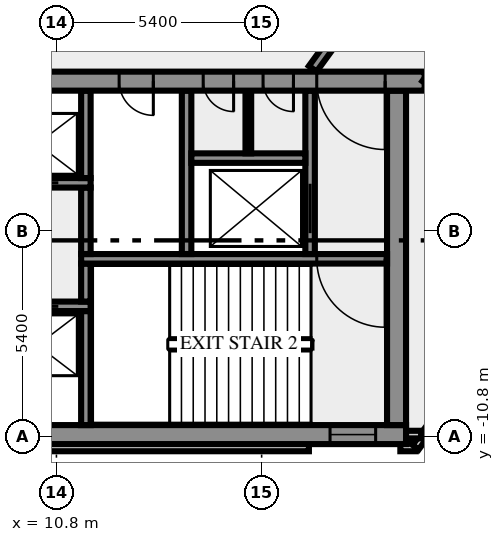
"""IFC4 building model, lengths in metres.
Left out: names, types, materials, properties, quantities, classifications, styles, units other than length and angle.
Written with IfcOpenShell. Run it as: python <this file> out.ifc"""

import sys

from ifc_helpers import new_model, si_unit, direction, frame, frame_2d, origin, place, context, subcontext, project, spatial, rectangle, extrude, element, fill, save


model = new_model("IFC4")
c1 = context("Model", 3, precision=1e-05, world=origin(), true_north=direction((0.0, 1.0)))
c2 = subcontext(c1, "Body", "Model", "MODEL_VIEW")
j1 = project(units=[si_unit("LENGTHUNIT", "METRE"), si_unit("PLANEANGLEUNIT", "RADIAN")], contexts=[c1])
p1 = place(None, origin())
s1 = spatial("IfcSite", under=j1, at=p1, CompositionType="ELEMENT")
p2 = place(p1, origin())
s2 = spatial("IfcBuilding", under=s1, at=p2, CompositionType="ELEMENT")
p3 = place(p2, frame((0.0, 0.0, 164.0)))
s3 = spatial("IfcBuildingStorey", under=s2, at=p3, CompositionType="ELEMENT", Elevation=164.0)
p4 = place(p3, frame((-17.444, -11.088, 0.0), z_axis=(0.0, 0.0, 1.0), x_axis=(1.0, 0.0, 0.0)))
e1 = element("IfcWall", 1, at=p4, inside=s3, PredefinedType="SOLIDWALL", context=c2, shape_type="SweptSolid", body=[
    extrude(rectangle(XDim=34.888, YDim=0.2, at=frame_2d((17.444, 0.0))), origin(), (0.0, 0.0, 1.0), 3.65),
])
p5 = place(p3, frame((19.85, -11.088, 0.0), z_axis=(0.0, 0.0, 1.0), x_axis=(1.0, 0.0, 0.0)))
e2 = element("IfcWall", 2, at=p5, inside=s3, PredefinedType="SOLIDWALL", context=c2, shape_type="SweptSolid", body=[
    extrude(rectangle(XDim=0.406, YDim=0.2, at=frame_2d((0.203, 0.0))), origin(), (0.0, 0.0, 1.0), 3.65),
])
p6 = place(p3, frame((20.253, -11.083, 0.0), z_axis=(0.0, 0.0, 1.0), x_axis=(0.587766567315, 0.809030569476, 0.0)))
e3 = element("IfcWall", 3, at=p6, inside=s3, PredefinedType="SOLIDWALL", context=c2, shape_type="SweptSolid", body=[
    extrude(rectangle(XDim=2.688, YDim=0.2, at=frame_2d((1.344, 0.0))), origin(), (0.0, 0.0, 1.0), 3.65),
])
p7 = place(p3, frame((19.98, -10.75, 0.0), z_axis=(0.0, 0.0, 1.0), x_axis=(1.0, 0.0, 0.0)))
e4 = element("IfcWall", 4, at=p7, inside=s3, PredefinedType="SOLIDWALL", context=c2, shape_type="SweptSolid", body=[
    extrude(rectangle(XDim=0.417, YDim=0.2, at=frame_2d((0.208, 0.0))), origin(), (0.0, 0.0, 1.0), 3.65),
])
p8 = place(p3, frame((-20.0, -10.75, 0.0), z_axis=(0.0, 0.0, 1.0), x_axis=(1.0, 0.0, 0.0)))
e5 = element("IfcWall", 5, at=p8, inside=s3, PredefinedType="SHEAR", context=c2, shape_type="SweptSolid", body=[
    extrude(rectangle(XDim=40.0, YDim=0.5, at=frame_2d((20.0, 0.0))), origin(), (0.0, 0.0, 1.0), 3.65),
])
p9 = place(p8, frame((0.8, 0.0, 1.0)))
e6 = element("IfcOpeningElement", 6, at=p9, cuts=e5, PredefinedType="OPENING", context=c2, shape_type="SweptSolid", body=[
    extrude(rectangle(XDim=1.2, YDim=1.2, at=frame_2d((0.6, 0.6))), frame((0.0, 0.26, 0.0), z_axis=(0.0, -1.0, 0.0), x_axis=(1.0, 0.0, 0.0)), (0.0, 0.0, 1.0), 0.52),
])
p10 = place(p8, frame((38.0, 0.0, 1.0)))
e7 = element("IfcOpeningElement", 7, at=p10, cuts=e5, PredefinedType="OPENING", context=c2, shape_type="SweptSolid", body=[
    extrude(rectangle(XDim=1.2, YDim=1.2, at=frame_2d((0.6, 0.6))), frame((0.0, 0.26, 0.0), z_axis=(0.0, -1.0, 0.0), x_axis=(1.0, 0.0, 0.0)), (0.0, 0.0, 1.0), 0.52),
])
p11 = place(p3, frame((11.575, -10.5, 0.0), z_axis=(0.0, 0.0, 1.0), x_axis=(0.0, 1.0, 0.0)))
e8 = element("IfcWall", 8, at=p11, inside=s3, PredefinedType="SHEAR", context=c2, shape_type="SweptSolid", body=[
    extrude(rectangle(XDim=3.0, YDim=0.25, at=frame_2d((1.5, 0.0))), origin(), (0.0, 0.0, 1.0), 3.65),
])
p12 = place(p3, frame((19.75, -10.5, 0.0), z_axis=(0.0, 0.0, 1.0), x_axis=(0.0, 1.0, 0.0)))
e9 = element("IfcWall", 9, at=p12, inside=s3, PredefinedType="SHEAR", context=c2, shape_type="SweptSolid", body=[
    extrude(rectangle(XDim=8.8, YDim=0.5, at=frame_2d((4.4, 0.0))), origin(), (0.0, 0.0, 1.0), 3.65),
])
p13 = place(p3, frame((11.7, -7.375, 0.0), z_axis=(0.0, 0.0, 1.0), x_axis=(-1.0, 0.0, 0.0)))
e10 = element("IfcWall", 10, at=p13, inside=s3, PredefinedType="SHEAR", context=c2, shape_type="SweptSolid", body=[
    extrude(rectangle(XDim=23.4, YDim=0.25, at=frame_2d((11.7, 0.0))), origin(), (0.0, 0.0, 1.0), 3.65),
])
p14 = place(p13, frame((22.012, 0.0, 0.0)))
e11 = element("IfcOpeningElement", 11, at=p14, cuts=e10, PredefinedType="OPENING", context=c2, shape_type="SweptSolid", body=[
    extrude(rectangle(XDim=0.9, YDim=2.1, at=frame_2d((0.45, 1.05))), frame((0.0, 0.135, 0.0), z_axis=(0.0, -1.0, 0.0), x_axis=(1.0, 0.0, 0.0)), (0.0, 0.0, 1.0), 0.27),
])
p15 = place(p13, frame((20.05, 0.0, 0.0)))
e12 = element("IfcOpeningElement", 12, at=p15, cuts=e10, PredefinedType="OPENING", context=c2, shape_type="SweptSolid", body=[
    extrude(rectangle(XDim=0.9, YDim=2.1, at=frame_2d((0.45, 1.05))), frame((0.0, 0.135, 0.0), z_axis=(0.0, -1.0, 0.0), x_axis=(1.0, 0.0, 0.0)), (0.0, 0.0, 1.0), 0.27),
])
p16 = place(p13, frame((17.088, 0.0, 0.0)))
e13 = element("IfcOpeningElement", 13, at=p16, cuts=e10, PredefinedType="OPENING", context=c2, shape_type="SweptSolid", body=[
    extrude(rectangle(XDim=0.9, YDim=2.1, at=frame_2d((0.45, 1.05))), frame((0.0, 0.135, 0.0), z_axis=(0.0, -1.0, 0.0), x_axis=(1.0, 0.0, 0.0)), (0.0, 0.0, 1.0), 0.27),
])
p17 = place(p13, frame((14.45, 0.0, 0.0)))
e14 = element("IfcOpeningElement", 14, at=p17, cuts=e10, PredefinedType="OPENING", context=c2, shape_type="SweptSolid", body=[
    extrude(rectangle(XDim=0.9, YDim=2.1, at=frame_2d((0.45, 1.05))), frame((0.0, 0.135, 0.0), z_axis=(0.0, -1.0, 0.0), x_axis=(1.0, 0.0, 0.0)), (0.0, 0.0, 1.0), 0.27),
])
p18 = place(p13, frame((12.95, 0.0, 0.0)))
e15 = element("IfcOpeningElement", 15, at=p18, cuts=e10, PredefinedType="OPENING", context=c2, shape_type="SweptSolid", body=[
    extrude(rectangle(XDim=0.9, YDim=2.1, at=frame_2d((0.45, 1.05))), frame((0.0, 0.135, 0.0), z_axis=(0.0, -1.0, 0.0), x_axis=(1.0, 0.0, 0.0)), (0.0, 0.0, 1.0), 0.27),
])
p19 = place(p13, frame((11.475, 0.0, 0.0)))
e16 = element("IfcOpeningElement", 16, at=p19, cuts=e10, PredefinedType="OPENING", context=c2, shape_type="SweptSolid", body=[
    extrude(rectangle(XDim=0.9, YDim=2.1, at=frame_2d((0.45, 1.05))), frame((0.0, 0.135, 0.0), z_axis=(0.0, -1.0, 0.0), x_axis=(1.0, 0.0, 0.0)), (0.0, 0.0, 1.0), 0.27),
])
p20 = place(p13, frame((10.45, 0.0, 0.0)))
e17 = element("IfcOpeningElement", 17, at=p20, cuts=e10, PredefinedType="OPENING", context=c2, shape_type="SweptSolid", body=[
    extrude(rectangle(XDim=0.5, YDim=2.1, at=frame_2d((0.25, 1.05))), frame((0.0, 0.135, 0.0), z_axis=(0.0, -1.0, 0.0), x_axis=(1.0, 0.0, 0.0)), (0.0, 0.0, 1.0), 0.27),
])
p21 = place(p13, frame((8.35, 0.0, 0.0)))
e18 = element("IfcOpeningElement", 18, at=p21, cuts=e10, PredefinedType="OPENING", context=c2, shape_type="SweptSolid", body=[
    extrude(rectangle(XDim=1.1, YDim=2.1, at=frame_2d((0.55, 1.05))), frame((0.0, 0.135, 0.0), z_axis=(0.0, -1.0, 0.0), x_axis=(1.0, 0.0, 0.0)), (0.0, 0.0, 1.0), 0.27),
])
p22 = place(p13, frame((5.85, 0.0, 0.0)))
e19 = element("IfcOpeningElement", 19, at=p22, cuts=e10, PredefinedType="OPENING", context=c2, shape_type="SweptSolid", body=[
    extrude(rectangle(XDim=1.1, YDim=2.1, at=frame_2d((0.55, 1.05))), frame((0.0, 0.135, 0.0), z_axis=(0.0, -1.0, 0.0), x_axis=(1.0, 0.0, 0.0)), (0.0, 0.0, 1.0), 0.27),
])
p23 = place(p13, frame((3.35, 0.0, 0.0)))
e20 = element("IfcOpeningElement", 20, at=p23, cuts=e10, PredefinedType="OPENING", context=c2, shape_type="SweptSolid", body=[
    extrude(rectangle(XDim=1.1, YDim=2.1, at=frame_2d((0.55, 1.05))), frame((0.0, 0.135, 0.0), z_axis=(0.0, -1.0, 0.0), x_axis=(1.0, 0.0, 0.0)), (0.0, 0.0, 1.0), 0.27),
])
p24 = place(p13, frame((0.85, 0.0, 0.0)))
e21 = element("IfcOpeningElement", 21, at=p24, cuts=e10, PredefinedType="OPENING", context=c2, shape_type="SweptSolid", body=[
    extrude(rectangle(XDim=1.1, YDim=2.1, at=frame_2d((0.55, 1.05))), frame((0.0, 0.135, 0.0), z_axis=(0.0, -1.0, 0.0), x_axis=(1.0, 0.0, 0.0)), (0.0, 0.0, 1.0), 0.27),
])
p25 = place(p3, frame((11.575, -7.25, 0.0), z_axis=(0.0, 0.0, 1.0), x_axis=(0.0, 1.0, 0.0)))
e22 = element("IfcWall", 22, at=p25, inside=s3, PredefinedType="SHEAR", context=c2, shape_type="SweptSolid", body=[
    extrude(rectangle(XDim=1.0, YDim=0.25, at=frame_2d((0.5, 0.0))), origin(), (0.0, 0.0, 1.0), 3.65),
])
p26 = place(p3, frame((19.5, -6.125, 0.0), z_axis=(0.0, 0.0, 1.0), x_axis=(-1.0, 0.0, 0.0)))
e23 = element("IfcWall", 23, at=p26, inside=s3, PredefinedType="SHEAR", context=c2, shape_type="SweptSolid", body=[
    extrude(rectangle(XDim=8.05, YDim=0.25, at=frame_2d((4.025, 0.0))), origin(), (0.0, 0.0, 1.0), 3.65),
])
p27 = place(p26, frame((0.05, 0.0, 0.0)))
e24 = element("IfcOpeningElement", 24, at=p27, cuts=e23, PredefinedType="OPENING", context=c2, shape_type="SweptSolid", body=[
    extrude(rectangle(XDim=1.8, YDim=2.1, at=frame_2d((0.9, 1.05))), frame((0.0, 0.135, 0.0), z_axis=(0.0, -1.0, 0.0), x_axis=(1.0, 0.0, 0.0)), (0.0, 0.0, 1.0), 0.27),
])
p28 = place(p3, frame((11.575, -6.0, 0.0), z_axis=(0.0, 0.0, 1.0), x_axis=(0.0, 1.0, 0.0)))
e25 = element("IfcWall", 25, at=p28, inside=s3, PredefinedType="SHEAR", context=c2, shape_type="SweptSolid", body=[
    extrude(rectangle(XDim=1.75, YDim=0.25, at=frame_2d((0.875, 0.0))), origin(), (0.0, 0.0, 1.0), 3.65),
])
p29 = place(p3, frame((14.225, -6.0, 0.0), z_axis=(0.0, 0.0, 1.0), x_axis=(0.0, 1.0, 0.0)))
e26 = element("IfcWall", 26, at=p29, inside=s3, PredefinedType="SHEAR", context=c2, shape_type="SweptSolid", body=[
    extrude(rectangle(XDim=4.3, YDim=0.25, at=frame_2d((2.15, 0.0))), origin(), (0.0, 0.0, 1.0), 3.65),
])
p30 = place(p3, frame((17.475, -6.0, 0.0), z_axis=(0.0, 0.0, 1.0), x_axis=(0.0, 1.0, 0.0)))
e27 = element("IfcWall", 27, at=p30, inside=s3, PredefinedType="SHEAR", context=c2, shape_type="SweptSolid", body=[
    extrude(rectangle(XDim=4.3, YDim=0.25, at=frame_2d((2.15, 0.0))), origin(), (0.0, 0.0, 1.0), 3.65),
])
p31 = place(p30, frame((0.55, 0.0, 0.0)))
e28 = element("IfcOpeningElement", 28, at=p31, cuts=e27, PredefinedType="OPENING", context=c2, shape_type="SweptSolid", body=[
    extrude(rectangle(XDim=1.3, YDim=2.1, at=frame_2d((0.65, 1.05))), frame((0.0, 0.135, 0.0), z_axis=(0.0, -1.0, 0.0), x_axis=(1.0, 0.0, 0.0)), (0.0, 0.0, 1.0), 0.27),
])
p32 = place(p3, frame((-0.6, -4.125, 0.0), z_axis=(0.0, 0.0, 1.0), x_axis=(1.0, 0.0, 0.0)))
e29 = element("IfcWall", 29, at=p32, inside=s3, PredefinedType="SHEAR", context=c2, shape_type="SweptSolid", body=[
    extrude(rectangle(XDim=12.3, YDim=0.25, at=frame_2d((6.15, 0.0))), origin(), (0.0, 0.0, 1.0), 3.65),
])
p33 = place(p32, frame((2.75, 0.0, 0.0)))
e30 = element("IfcOpeningElement", 30, at=p33, cuts=e29, PredefinedType="OPENING", context=c2, shape_type="SweptSolid", body=[
    extrude(rectangle(XDim=1.3, YDim=2.1, at=frame_2d((0.65, 1.05))), frame((0.0, 0.135, 0.0), z_axis=(0.0, -1.0, 0.0), x_axis=(1.0, 0.0, 0.0)), (0.0, 0.0, 1.0), 0.27),
])
p34 = place(p32, frame((5.35, 0.0, 0.0)))
e31 = element("IfcOpeningElement", 31, at=p34, cuts=e29, PredefinedType="OPENING", context=c2, shape_type="SweptSolid", body=[
    extrude(rectangle(XDim=1.1, YDim=2.1, at=frame_2d((0.55, 1.05))), frame((0.0, 0.135, 0.0), z_axis=(0.0, -1.0, 0.0), x_axis=(1.0, 0.0, 0.0)), (0.0, 0.0, 1.0), 0.27),
])
p35 = place(p32, frame((7.85, 0.0, 0.0)))
e32 = element("IfcOpeningElement", 32, at=p35, cuts=e29, PredefinedType="OPENING", context=c2, shape_type="SweptSolid", body=[
    extrude(rectangle(XDim=1.1, YDim=2.1, at=frame_2d((0.55, 1.05))), frame((0.0, 0.135, 0.0), z_axis=(0.0, -1.0, 0.0), x_axis=(1.0, 0.0, 0.0)), (0.0, 0.0, 1.0), 0.27),
])
p36 = place(p32, frame((10.35, 0.0, 0.0)))
e33 = element("IfcOpeningElement", 33, at=p36, cuts=e29, PredefinedType="OPENING", context=c2, shape_type="SweptSolid", body=[
    extrude(rectangle(XDim=1.1, YDim=2.1, at=frame_2d((0.55, 1.05))), frame((0.0, 0.135, 0.0), z_axis=(0.0, -1.0, 0.0), x_axis=(1.0, 0.0, 0.0)), (0.0, 0.0, 1.0), 0.27),
])
p37 = place(p3, frame((11.575, -4.0, 0.0), z_axis=(0.0, 0.0, 1.0), x_axis=(0.0, 1.0, 0.0)))
e34 = element("IfcWall", 34, at=p37, inside=s3, PredefinedType="SHEAR", context=c2, shape_type="SweptSolid", body=[
    extrude(rectangle(XDim=2.3, YDim=0.25, at=frame_2d((1.15, 0.0))), origin(), (0.0, 0.0, 1.0), 3.65),
])
p38 = place(p3, frame((14.35, -3.475, 0.0), z_axis=(0.0, 0.0, 1.0), x_axis=(1.0, 0.0, 0.0)))
e35 = element("IfcWall", 35, at=p38, inside=s3, PredefinedType="SHEAR", context=c2, shape_type="SweptSolid", body=[
    extrude(rectangle(XDim=3.0, YDim=0.25, at=frame_2d((1.5, 0.0))), origin(), (0.0, 0.0, 1.0), 3.65),
])
p39 = place(p3, frame((15.85, -3.35, 0.0), z_axis=(0.0, 0.0, 1.0), x_axis=(0.0, 1.0, 0.0)))
e36 = element("IfcWall", 36, at=p39, inside=s3, PredefinedType="PARTITIONING", context=c2, shape_type="SweptSolid", body=[
    extrude(rectangle(XDim=1.65, YDim=0.15, at=frame_2d((0.825, 0.0))), origin(), (0.0, 0.0, 1.0), 3.65),
])
p40 = place(p3, frame((20.49, -1.45, 0.0), z_axis=(0.0, 0.0, 1.0), x_axis=(-1.0, 0.0, 0.0)))
e37 = element("IfcWall", 37, at=p40, inside=s3, PredefinedType="SHEAR", context=c2, shape_type="SweptSolid", body=[
    extrude(rectangle(XDim=40.98, YDim=0.5, at=frame_2d((20.49, 0.0))), origin(), (0.0, 0.0, 1.0), 3.65),
])
p41 = place(p40, frame((38.14, 0.0, 0.0)))
e38 = element("IfcOpeningElement", 38, at=p41, cuts=e37, PredefinedType="OPENING", context=c2, shape_type="SweptSolid", body=[
    extrude(rectangle(XDim=1.8, YDim=2.1, at=frame_2d((0.9, 1.05))), frame((0.0, 0.26, 0.0), z_axis=(0.0, -1.0, 0.0), x_axis=(1.0, 0.0, 0.0)), (0.0, 0.0, 1.0), 0.52),
])
p42 = place(p40, frame((35.89, 0.0, 0.0)))
e39 = element("IfcOpeningElement", 39, at=p42, cuts=e37, PredefinedType="OPENING", context=c2, shape_type="SweptSolid", body=[
    extrude(rectangle(XDim=0.9, YDim=2.1, at=frame_2d((0.45, 1.05))), frame((0.0, 0.26, 0.0), z_axis=(0.0, -1.0, 0.0), x_axis=(1.0, 0.0, 0.0)), (0.0, 0.0, 1.0), 0.52),
])
p43 = place(p40, frame((32.94, 0.0, 0.0)))
e40 = element("IfcOpeningElement", 40, at=p43, cuts=e37, PredefinedType="OPENING", context=c2, shape_type="SweptSolid", body=[
    extrude(rectangle(XDim=0.9, YDim=2.1, at=frame_2d((0.45, 1.05))), frame((0.0, 0.26, 0.0), z_axis=(0.0, -1.0, 0.0), x_axis=(1.0, 0.0, 0.0)), (0.0, 0.0, 1.0), 0.52),
])
p44 = place(p40, frame((28.802, 0.0, 0.0)))
e41 = element("IfcOpeningElement", 41, at=p44, cuts=e37, PredefinedType="OPENING", context=c2, shape_type="SweptSolid", body=[
    extrude(rectangle(XDim=0.9, YDim=2.1, at=frame_2d((0.45, 1.05))), frame((0.0, 0.26, 0.0), z_axis=(0.0, -1.0, 0.0), x_axis=(1.0, 0.0, 0.0)), (0.0, 0.0, 1.0), 0.52),
])
p45 = place(p40, frame((25.077, 0.0, 0.0)))
e42 = element("IfcOpeningElement", 42, at=p45, cuts=e37, PredefinedType="OPENING", context=c2, shape_type="SweptSolid", body=[
    extrude(rectangle(XDim=0.9, YDim=2.1, at=frame_2d((0.45, 1.05))), frame((0.0, 0.26, 0.0), z_axis=(0.0, -1.0, 0.0), x_axis=(1.0, 0.0, 0.0)), (0.0, 0.0, 1.0), 0.52),
])
p46 = place(p40, frame((21.765, 0.0, 0.0)))
e43 = element("IfcOpeningElement", 43, at=p46, cuts=e37, PredefinedType="OPENING", context=c2, shape_type="SweptSolid", body=[
    extrude(rectangle(XDim=2.0, YDim=2.1, at=frame_2d((1.0, 1.05))), frame((0.0, 0.26, 0.0), z_axis=(0.0, -1.0, 0.0), x_axis=(1.0, 0.0, 0.0)), (0.0, 0.0, 1.0), 0.52),
])
p47 = place(p40, frame((7.14, 0.0, 0.0)))
e44 = element("IfcOpeningElement", 44, at=p47, cuts=e37, PredefinedType="OPENING", context=c2, shape_type="SweptSolid", body=[
    extrude(rectangle(XDim=0.9, YDim=2.1, at=frame_2d((0.45, 1.05))), frame((0.0, 0.26, 0.0), z_axis=(0.0, -1.0, 0.0), x_axis=(1.0, 0.0, 0.0)), (0.0, 0.0, 1.0), 0.52),
])
p48 = place(p40, frame((5.028, 0.0, 0.0)))
e45 = element("IfcOpeningElement", 45, at=p48, cuts=e37, PredefinedType="OPENING", context=c2, shape_type="SweptSolid", body=[
    extrude(rectangle(XDim=0.8, YDim=2.1, at=frame_2d((0.4, 1.05))), frame((0.0, 0.26, 0.0), z_axis=(0.0, -1.0, 0.0), x_axis=(1.0, 0.0, 0.0)), (0.0, 0.0, 1.0), 0.52),
])
p49 = place(p40, frame((3.452, 0.0, 0.0)))
e46 = element("IfcOpeningElement", 46, at=p49, cuts=e37, PredefinedType="OPENING", context=c2, shape_type="SweptSolid", body=[
    extrude(rectangle(XDim=0.8, YDim=2.1, at=frame_2d((0.4, 1.05))), frame((0.0, 0.26, 0.0), z_axis=(0.0, -1.0, 0.0), x_axis=(1.0, 0.0, 0.0)), (0.0, 0.0, 1.0), 0.52),
])
p50 = place(p40, frame((1.04, 0.0, 0.0)))
e47 = element("IfcOpeningElement", 47, at=p50, cuts=e37, PredefinedType="OPENING", context=c2, shape_type="SweptSolid", body=[
    extrude(rectangle(XDim=1.8, YDim=2.1, at=frame_2d((0.9, 1.05))), frame((0.0, 0.26, 0.0), z_axis=(0.0, -1.0, 0.0), x_axis=(1.0, 0.0, 0.0)), (0.0, 0.0, 1.0), 0.52),
])
p51 = place(p3, frame((17.545, -1.125, 0.0), z_axis=(0.0, 0.0, 1.0), x_axis=(0.587786330937, 0.809016210693, 0.0)))
e48 = element("IfcWall", 48, at=p51, inside=s3, PredefinedType="SOLIDWALL", context=c2, shape_type="SweptSolid", body=[
    extrude(rectangle(XDim=30.103, YDim=0.25, at=frame_2d((15.052, 0.0))), origin(), (0.0, 0.0, 1.0), 3.65),
])
p52 = place(p51, frame((3.441, 0.0, 0.0)))
e49 = element("IfcOpeningElement", 49, at=p52, cuts=e48, PredefinedType="OPENING", context=c2, shape_type="SweptSolid", body=[
    extrude(rectangle(XDim=0.9, YDim=2.1, at=frame_2d((0.45, 1.05))), frame((0.0, 0.135, 0.0), z_axis=(0.0, -1.0, 0.0), x_axis=(1.0, 0.0, 0.0)), (0.0, 0.0, 1.0), 0.27),
])
p53 = place(p51, frame((28.729, 0.0, 0.0)))
e50 = element("IfcOpeningElement", 50, at=p53, cuts=e48, PredefinedType="OPENING", context=c2, shape_type="SweptSolid", body=[
    extrude(rectangle(XDim=0.9, YDim=2.1, at=frame_2d((0.45, 1.05))), frame((0.0, 0.135, 0.0), z_axis=(0.0, -1.0, 0.0), x_axis=(1.0, 0.0, 0.0)), (0.0, 0.0, 1.0), 0.27),
])
p54 = place(p3, frame((37.236, 21.469, 0.0), z_axis=(0.0, 0.0, 1.0), x_axis=(-0.58778344073, -0.809018310549, 0.0)))
e51 = element("IfcWall", 51, at=p54, inside=s3, PredefinedType="SOLIDWALL", context=c2, shape_type="SweptSolid", body=[
    extrude(rectangle(XDim=28.42, YDim=0.25, at=frame_2d((14.21, 0.0))), origin(), (0.0, 0.0, 1.0), 3.65),
])
p55 = place(p54, frame((14.554, 0.0, 0.0)))
e52 = element("IfcOpeningElement", 52, at=p55, cuts=e51, PredefinedType="OPENING", context=c2, shape_type="SweptSolid", body=[
    extrude(rectangle(XDim=0.9, YDim=2.1, at=frame_2d((0.45, 1.05))), frame((0.0, 0.135, 0.0), z_axis=(0.0, -1.0, 0.0), x_axis=(1.0, 0.0, 0.0)), (0.0, 0.0, 1.0), 0.27),
])
p56 = place(p54, frame((10.255, 0.0, 0.0)))
e53 = element("IfcOpeningElement", 53, at=p56, cuts=e51, PredefinedType="OPENING", context=c2, shape_type="SweptSolid", body=[
    extrude(rectangle(XDim=0.9, YDim=2.1, at=frame_2d((0.45, 1.05))), frame((0.0, 0.135, 0.0), z_axis=(0.0, -1.0, 0.0), x_axis=(1.0, 0.0, 0.0)), (0.0, 0.0, 1.0), 0.27),
])
p57 = place(p54, frame((11.854, 0.0, 0.0)))
e54 = element("IfcOpeningElement", 54, at=p57, cuts=e51, PredefinedType="OPENING", context=c2, shape_type="SweptSolid", body=[
    extrude(rectangle(XDim=0.9, YDim=2.1, at=frame_2d((0.45, 1.05))), frame((0.0, 0.135, 0.0), z_axis=(0.0, -1.0, 0.0), x_axis=(1.0, 0.0, 0.0)), (0.0, 0.0, 1.0), 0.27),
])
p58 = place(p10, origin())
e55 = element("IfcWindow", 55, at=p58, inside=s3, PartitioningType="SINGLE_PANEL", PredefinedType="WINDOW", context=c2, shape_type="SweptSolid", body=[
    extrude(rectangle(XDim=1.2, YDim=1.2, at=frame_2d((0.6, 0.6))), frame((0.0, 0.03, 0.0), z_axis=(0.0, -1.0, 0.0), x_axis=(1.0, 0.0, 0.0)), (0.0, 0.0, 1.0), 0.06),
])
fill(e7, e55)
p59 = place(p24, origin())
e56 = element("IfcDoor", 56, at=p59, inside=s3, OperationType="DOUBLE_DOOR_SLIDING", PredefinedType="DOOR", context=c2, shape_type="SweptSolid", body=[
    extrude(rectangle(XDim=1.1, YDim=2.1, at=frame_2d((0.55, 1.05))), frame((0.0, 0.025, 0.0), z_axis=(0.0, -1.0, 0.0), x_axis=(1.0, 0.0, 0.0)), (0.0, 0.0, 1.0), 0.05),
])
fill(e21, e56)
p60 = place(p27, origin())
e57 = element("IfcDoor", 57, at=p60, inside=s3, OperationType="DOUBLE_DOOR_SINGLE_SWING", PredefinedType="DOOR", context=c2, shape_type="SweptSolid", body=[
    extrude(rectangle(XDim=1.8, YDim=2.1, at=frame_2d((0.9, 1.05))), frame((0.0, 0.025, 0.0), z_axis=(0.0, -1.0, 0.0), x_axis=(1.0, 0.0, 0.0)), (0.0, 0.0, 1.0), 0.05),
])
fill(e24, e57)
p61 = place(p31, origin())
e58 = element("IfcDoor", 58, at=p61, inside=s3, OperationType="DOUBLE_DOOR_SLIDING", PredefinedType="DOOR", context=c2, shape_type="SweptSolid", body=[
    extrude(rectangle(XDim=1.3, YDim=2.1, at=frame_2d((0.65, 1.05))), frame((0.0, 0.025, 0.0), z_axis=(0.0, -1.0, 0.0), x_axis=(1.0, 0.0, 0.0)), (0.0, 0.0, 1.0), 0.05),
])
fill(e28, e58)
p62 = place(p36, origin())
e59 = element("IfcDoor", 59, at=p62, inside=s3, OperationType="DOUBLE_DOOR_SLIDING", PredefinedType="DOOR", context=c2, shape_type="SweptSolid", body=[
    extrude(rectangle(XDim=1.1, YDim=2.1, at=frame_2d((0.55, 1.05))), frame((0.0, 0.025, 0.0), z_axis=(0.0, -1.0, 0.0), x_axis=(1.0, 0.0, 0.0)), (0.0, 0.0, 1.0), 0.05),
])
fill(e33, e59)
p63 = place(p47, origin())
e60 = element("IfcDoor", 60, at=p63, inside=s3, OperationType="SINGLE_SWING_LEFT", PredefinedType="DOOR", context=c2, shape_type="SweptSolid", body=[
    extrude(rectangle(XDim=0.9, YDim=2.1, at=frame_2d((0.45, 1.05))), frame((0.0, 0.025, 0.0), z_axis=(0.0, -1.0, 0.0), x_axis=(1.0, 0.0, 0.0)), (0.0, 0.0, 1.0), 0.05),
])
fill(e44, e60)
p64 = place(p48, origin())
e61 = element("IfcDoor", 61, at=p64, inside=s3, OperationType="SINGLE_SWING_LEFT", PredefinedType="DOOR", context=c2, shape_type="SweptSolid", body=[
    extrude(rectangle(XDim=0.8, YDim=2.1, at=frame_2d((0.4, 1.05))), frame((0.0, 0.025, 0.0), z_axis=(0.0, -1.0, 0.0), x_axis=(1.0, 0.0, 0.0)), (0.0, 0.0, 1.0), 0.05),
])
fill(e45, e61)
p65 = place(p49, origin())
e62 = element("IfcDoor", 62, at=p65, inside=s3, OperationType="SINGLE_SWING_LEFT", PredefinedType="DOOR", context=c2, shape_type="SweptSolid", body=[
    extrude(rectangle(XDim=0.8, YDim=2.1, at=frame_2d((0.4, 1.05))), frame((0.0, 0.025, 0.0), z_axis=(0.0, -1.0, 0.0), x_axis=(1.0, 0.0, 0.0)), (0.0, 0.0, 1.0), 0.05),
])
fill(e46, e62)
p66 = place(p50, origin())
e63 = element("IfcDoor", 63, at=p66, inside=s3, OperationType="DOUBLE_DOOR_SINGLE_SWING", PredefinedType="DOOR", context=c2, shape_type="SweptSolid", body=[
    extrude(rectangle(XDim=1.8, YDim=2.1, at=frame_2d((0.9, 1.05))), frame((0.0, 0.025, 0.0), z_axis=(0.0, -1.0, 0.0), x_axis=(1.0, 0.0, 0.0)), (0.0, 0.0, 1.0), 0.05),
])
fill(e47, e63)
save(model, sys.argv[1])
